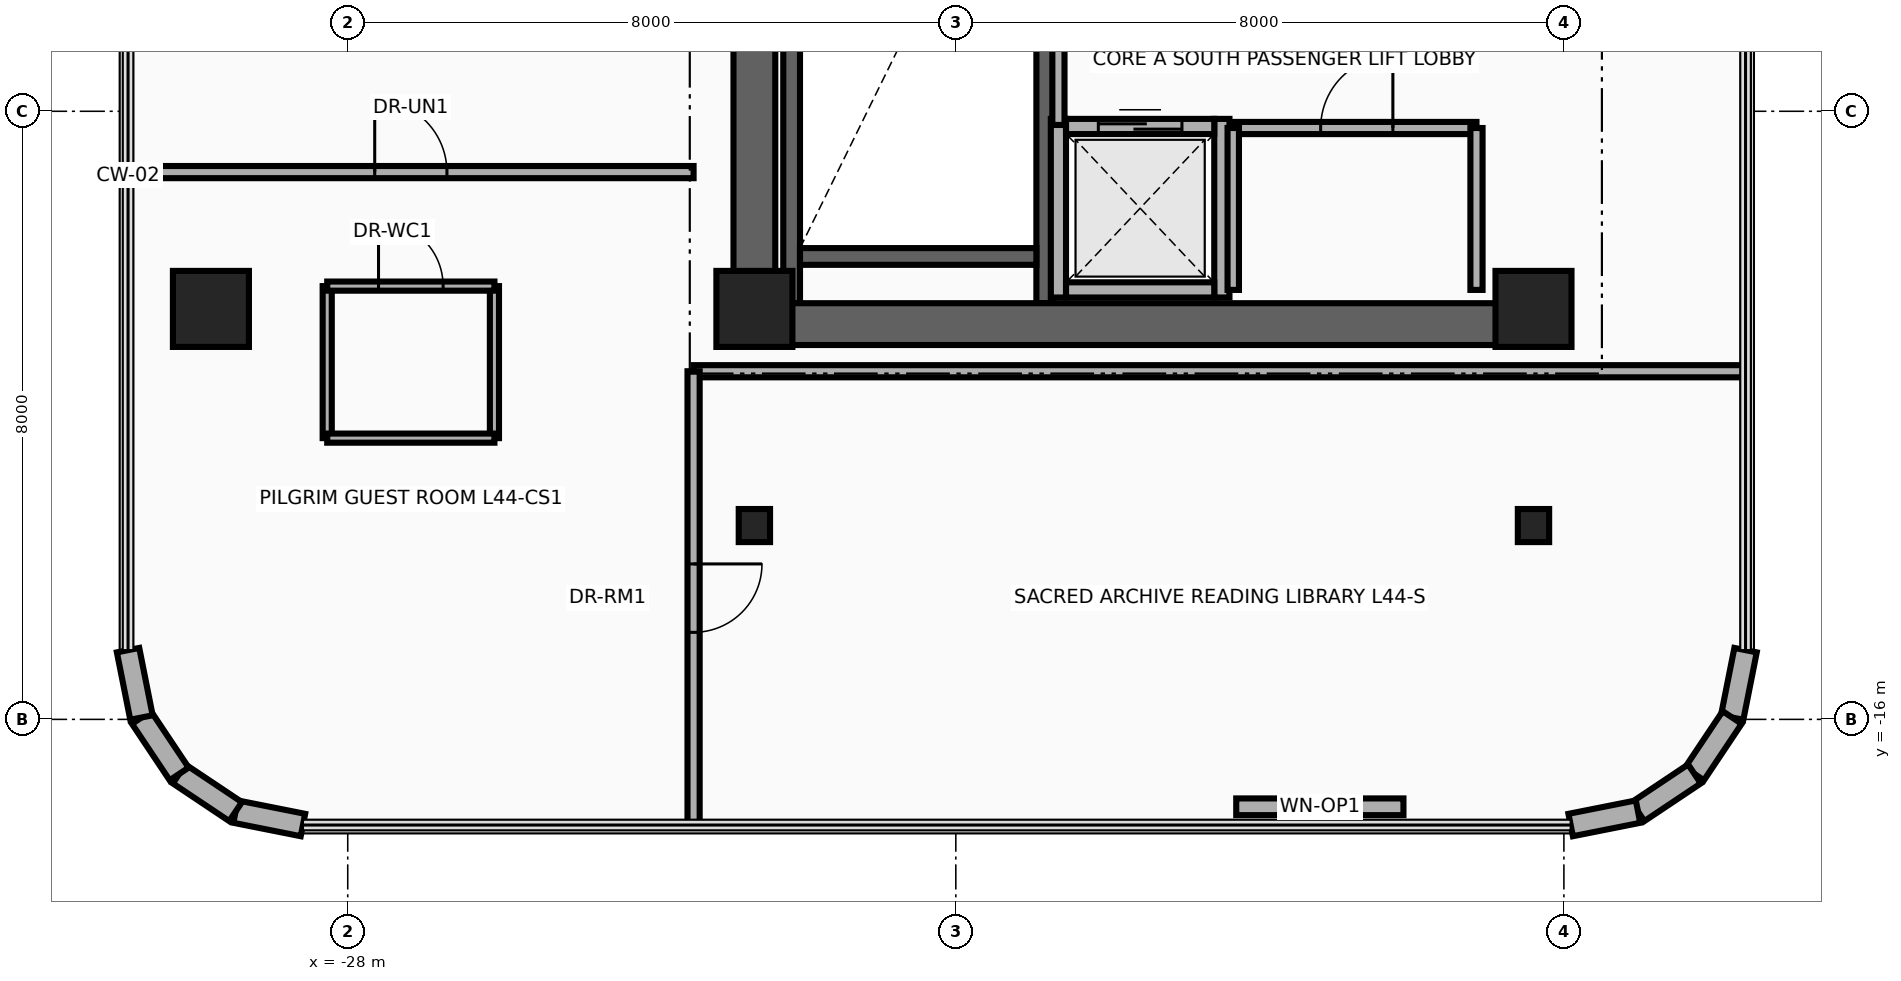
"""IFC4 building model, lengths in metres.
Left out: names, types, materials, properties, quantities, classifications, styles, units other than length and angle.
Written with IfcOpenShell. Run it as: python <this file> out.ifc"""

import sys

from ifc_helpers import new_model, si_unit, direction, frame, frame_2d, origin, origin_2d, place, context, subcontext, project, spatial, rectangle, i_section, extrude, source, transform, mapped, element, fill, save


model = new_model("IFC4")
c1 = context("Model", 3, precision=1e-05, world=origin(), true_north=direction((0.0, 1.0)))
c2 = subcontext(c1, "Body", "Model", "MODEL_VIEW")
j1 = project(units=[si_unit("LENGTHUNIT", "METRE"), si_unit("PLANEANGLEUNIT", "RADIAN")], contexts=[c1])
p1 = place(None, origin())
s1 = spatial("IfcSite", under=j1, at=p1, CompositionType="ELEMENT")
p2 = place(p1, origin())
s2 = spatial("IfcBuilding", under=s1, at=p2, CompositionType="ELEMENT")
p3 = place(p2, frame((0.0, 0.0, 172.3)))
s3 = spatial("IfcBuildingStorey", under=s2, at=p3, CompositionType="ELEMENT", Elevation=172.3)
for number, where, z_axis, x_axis in (
    (1, (-22.16, -10.525, 0.0), (0.0, 0.0, 1.0), (0.0, 1.0, 0.0)),
    (2, (-18.83, -10.525, 0.0), (0.0, 0.0, 1.0), (0.0, 1.0, 0.0)),
):
    element("IfcWall", number, at=place(p3, frame(where, z_axis=z_axis, x_axis=x_axis)), inside=s3, PredefinedType="SHEAR", context=c2, shape_type="SweptSolid", body=[
        extrude(rectangle(XDim=8.745, YDim=0.22, at=frame_2d((4.373, 0.0))), origin(), (0.0, 0.0, 1.0), 3.93),
    ])
p4 = place(p3, frame((-22.05, -9.91, 0.0), z_axis=(0.0, 0.0, 1.0), x_axis=(1.0, 0.0, 0.0)))
e3 = element("IfcWall", 3, at=p4, inside=s3, PredefinedType="SHEAR", context=c2, shape_type="SweptSolid", body=[
    extrude(rectangle(XDim=3.11, YDim=0.22, at=frame_2d((1.555, 0.0))), origin(), (0.0, 0.0, 1.0), 3.93),
])
p5 = place(p3, frame((-22.65, -11.075, 0.0), z_axis=(0.0, 0.0, 1.0), x_axis=(0.0, 1.0, 0.0)))
e4 = element("IfcWall", 4, at=p5, inside=s3, PredefinedType="SHEAR", context=c2, shape_type="SweptSolid", body=[
    extrude(rectangle(XDim=22.15, YDim=0.55, at=frame_2d((11.075, 0.0))), origin(), (0.0, 0.0, 1.0), 3.93),
])
p6 = place(p3, frame((-22.65, -10.8, 0.0), z_axis=(0.0, 0.0, 1.0), x_axis=(1.0, 0.0, 0.0)))
e5 = element("IfcWall", 5, at=p6, inside=s3, PredefinedType="SHEAR", context=c2, shape_type="SweptSolid", body=[
    extrude(rectangle(XDim=10.25, YDim=0.55, at=frame_2d((5.125, 0.0))), origin(), (0.0, 0.0, 1.0), 3.93),
])
m1 = source(origin(), c2, "Body", "SweptSolid", [
    extrude(rectangle(XDim=1.0, YDim=1.0, at=origin_2d()), origin(), (0.0, 0.0, 1.0), 4.25),
])
for number, where, z_axis, x_axis in (
    (6, (-29.8, -10.6, 0.0), (0.0, 0.0, 1.0), (1.0, 0.0, 0.0)),
    (7, (-22.65, -10.6, 0.0), (0.0, 0.0, 1.0), (1.0, 0.0, 0.0)),
    (8, (-12.4, -10.6, 0.0), (0.0, 0.0, 1.0), (1.0, 0.0, 0.0)),
):
    element("IfcColumn", number, at=place(p3, frame(where, z_axis=z_axis, x_axis=x_axis)), inside=s3, PredefinedType="COLUMN", context=c2, shape_type="MappedRepresentation", body=[
        mapped(m1, transform((0.0, 0.0, 0.0), x_axis=(1.0, 0.0, 0.0), y_axis=(0.0, 1.0, 0.0), z_axis=(0.0, 0.0, 1.0), scale=1.0)),
    ])
m2 = source(origin(), c2, "Body", "SweptSolid", [
    extrude(i_section(OverallWidth=0.412, OverallDepth=0.435, WebThickness=0.036, FlangeThickness=0.057, at=origin_2d()), origin(), (0.0, 0.0, 1.0), 4.25),
])
for number, where, z_axis, x_axis in (
    (9, (-22.65, -13.45, 0.0), (0.0, 0.0, 1.0), (1.0, 0.0, 0.0)),
    (10, (-12.4, -13.45, 0.0), (0.0, 0.0, 1.0), (1.0, 0.0, 0.0)),
):
    element("IfcColumn", number, at=place(p3, frame(where, z_axis=z_axis, x_axis=x_axis)), inside=s3, PredefinedType="COLUMN", context=c2, shape_type="MappedRepresentation", body=[
        mapped(m2, transform((0.0, 0.0, 0.0), x_axis=(1.0, 0.0, 0.0), y_axis=(0.0, 1.0, 0.0), z_axis=(0.0, 0.0, 1.0), scale=1.0)),
    ])
p7 = place(p3, frame((-9.61, -15.089, 0.0), z_axis=(0.0, 0.0, 1.0), x_axis=(-0.195025152871, -0.980798241101, 0.0)))
e11 = element("IfcWall", 11, at=p7, inside=s3, PredefinedType="SOLIDWALL", context=c2, shape_type="SweptSolid", body=[
    extrude(rectangle(XDim=0.904, YDim=0.3, at=frame_2d((0.452, 0.0))), origin(), (0.0, 0.0, 1.0), 3.93),
])
for number, where, z_axis, x_axis in (
    (12, (-9.786, -15.976, 0.0), (0.0, 0.0, 1.0), (-0.556, -0.832, 0.0)),
    (13, (-10.282, -16.718, 0.0), (0.0, 0.0, 1.0), (-0.832, -0.556, 0.0)),
):
    element("IfcWall", number, at=place(p3, frame(where, z_axis=z_axis, x_axis=x_axis)), inside=s3, PredefinedType="SOLIDWALL", context=c2, shape_type="SweptSolid", body=[
        extrude(rectangle(XDim=0.893, YDim=0.3, at=frame_2d((0.446, 0.0))), origin(), (0.0, 0.0, 1.0), 3.93),
    ])
p8 = place(p3, frame((-11.024, -17.214, 0.0), z_axis=(0.0, 0.0, 1.0), x_axis=(-0.980798241101, -0.195025152871, 0.0)))
e14 = element("IfcWall", 14, at=p8, inside=s3, PredefinedType="SOLIDWALL", context=c2, shape_type="SweptSolid", body=[
    extrude(rectangle(XDim=0.904, YDim=0.3, at=frame_2d((0.452, 0.0))), origin(), (0.0, 0.0, 1.0), 3.93),
])
p9 = place(p3, frame((-14.111, -17.15, 0.0), z_axis=(0.0, 0.0, 1.0), x_axis=(-1.0, 0.0, 0.0)))
e15 = element("IfcWall", 15, at=p9, inside=s3, PredefinedType="SOLIDWALL", context=c2, shape_type="SweptSolid", body=[
    extrude(rectangle(XDim=2.2, YDim=0.22, at=frame_2d((1.1, 0.0))), origin(), (0.0, 0.0, 1.0), 3.93),
])
p10 = place(p9, frame((0.65, 0.0, 0.95)))
e16 = element("IfcOpeningElement", 16, at=p10, cuts=e15, PredefinedType="OPENING", context=c2, shape_type="SweptSolid", body=[
    extrude(rectangle(XDim=0.9, YDim=1.3, at=frame_2d((0.45, 0.65))), frame((0.0, 0.125, 0.0), z_axis=(0.0, -1.0, 0.0), x_axis=(1.0, 0.0, 0.0)), (0.0, 0.0, 1.0), 0.25),
])
p11 = place(p3, frame((-28.589, -17.39, 0.0), z_axis=(0.0, 0.0, 1.0), x_axis=(-0.980798241101, 0.195025152871, 0.0)))
e17 = element("IfcWall", 17, at=p11, inside=s3, PredefinedType="SOLIDWALL", context=c2, shape_type="SweptSolid", body=[
    extrude(rectangle(XDim=0.904, YDim=0.3, at=frame_2d((0.452, 0.0))), origin(), (0.0, 0.0, 1.0), 3.93),
])
for number, where, z_axis, x_axis in (
    (18, (-29.476, -17.214, 0.0), (0.0, 0.0, 1.0), (-0.832, 0.556, 0.0)),
    (19, (-30.218, -16.718, 0.0), (0.0, 0.0, 1.0), (-0.556, 0.832, 0.0)),
):
    element("IfcWall", number, at=place(p3, frame(where, z_axis=z_axis, x_axis=x_axis)), inside=s3, PredefinedType="SOLIDWALL", context=c2, shape_type="SweptSolid", body=[
        extrude(rectangle(XDim=0.893, YDim=0.3, at=frame_2d((0.446, 0.0))), origin(), (0.0, 0.0, 1.0), 3.93),
    ])
p12 = place(p3, frame((-30.714, -15.976, 0.0), z_axis=(0.0, 0.0, 1.0), x_axis=(-0.195025152871, 0.980798241101, 0.0)))
e20 = element("IfcWall", 20, at=p12, inside=s3, PredefinedType="SOLIDWALL", context=c2, shape_type="SweptSolid", body=[
    extrude(rectangle(XDim=0.904, YDim=0.3, at=frame_2d((0.452, 0.0))), origin(), (0.0, 0.0, 1.0), 3.93),
])
for number, where, z_axis, x_axis in (
    (21, (-18.65, -10.45, 0.0), (0.0, 0.0, 1.0), (0.0, 1.0, 0.0)),
    (22, (-16.5, -10.45, 0.0), (0.0, 0.0, 1.0), (0.0, 1.0, 0.0)),
):
    element("IfcWall", number, at=place(p3, frame(where, z_axis=z_axis, x_axis=x_axis)), inside=s3, PredefinedType="MOVABLE", context=c2, shape_type="SweptSolid", body=[
        extrude(rectangle(XDim=2.35, YDim=0.2, at=frame_2d((1.175, 0.0))), origin(), (0.0, 0.0, 1.0), 2.965),
    ])
p13 = place(p3, frame((-18.55, -10.35, 0.0), z_axis=(0.0, 0.0, 1.0), x_axis=(1.0, 0.0, 0.0)))
e23 = element("IfcWall", 23, at=p13, inside=s3, PredefinedType="MOVABLE", context=c2, shape_type="SweptSolid", body=[
    extrude(rectangle(XDim=1.95, YDim=0.2, at=frame_2d((0.975, 0.0))), origin(), (0.0, 0.0, 1.0), 2.965),
])
p14 = place(p3, frame((-18.55, -8.2, 0.0), z_axis=(0.0, 0.0, 1.0), x_axis=(1.0, 0.0, 0.0)))
e24 = element("IfcWall", 24, at=p14, inside=s3, PredefinedType="MOVABLE", context=c2, shape_type="SweptSolid", body=[
    extrude(rectangle(XDim=1.95, YDim=0.2, at=frame_2d((0.975, 0.0))), origin(), (0.0, 0.0, 1.0), 3.93),
])
p15 = place(p14, frame((0.425, 0.0, 0.0)))
e25 = element("IfcOpeningElement", 25, at=p15, cuts=e24, PredefinedType="OPENING", context=c2, shape_type="SweptSolid", body=[
    extrude(rectangle(XDim=1.1, YDim=2.1, at=frame_2d((0.55, 1.05))), frame((0.0, 0.115, 0.0), z_axis=(0.0, -1.0, 0.0), x_axis=(1.0, 0.0, 0.0)), (0.0, 0.0, 1.0), 0.23),
])
p16 = place(p3, frame((-18.65, -8.18, 0.0), z_axis=(0.0, 0.0, 1.0), x_axis=(0.0, 1.0, 0.0)))
e26 = element("IfcWall", 26, at=p16, inside=s3, PredefinedType="PARTITIONING", context=c2, shape_type="SweptSolid", body=[
    extrude(rectangle(XDim=1.56, YDim=0.16, at=frame_2d((0.78, 0.0))), origin(), (0.0, 0.0, 1.0), 3.93),
])
p17 = place(p3, frame((-16.35, -8.22, 0.0), z_axis=(0.0, 0.0, 1.0), x_axis=(1.0, 0.0, 0.0)))
e27 = element("IfcWall", 27, at=p17, inside=s3, PredefinedType="PARTITIONING", context=c2, shape_type="SweptSolid", body=[
    extrude(rectangle(XDim=3.2, YDim=0.16, at=frame_2d((1.6, 0.0))), origin(), (0.0, 0.0, 1.0), 3.93),
])
p18 = place(p17, frame((1.15, 0.0, 0.0)))
e28 = element("IfcOpeningElement", 28, at=p18, cuts=e27, PredefinedType="OPENING", context=c2, shape_type="SweptSolid", body=[
    extrude(rectangle(XDim=0.95, YDim=2.15, at=frame_2d((0.475, 1.075))), frame((0.0, 0.095, 0.0), z_axis=(0.0, -1.0, 0.0), x_axis=(1.0, 0.0, 0.0)), (0.0, 0.0, 1.0), 0.19),
])
p19 = place(p3, frame((-16.35, -10.35, 0.0), z_axis=(0.0, 0.0, 1.0), x_axis=(0.0, 1.0, 0.0)))
e29 = element("IfcWall", 29, at=p19, inside=s3, PredefinedType="PARTITIONING", context=c2, shape_type="SweptSolid", body=[
    extrude(rectangle(XDim=2.13, YDim=0.15, at=frame_2d((1.065, 0.0))), origin(), (0.0, 0.0, 1.0), 3.93),
])
p20 = place(p3, frame((-13.15, -10.35, 0.0), z_axis=(0.0, 0.0, 1.0), x_axis=(0.0, 1.0, 0.0)))
e30 = element("IfcWall", 30, at=p20, inside=s3, PredefinedType="PARTITIONING", context=c2, shape_type="SweptSolid", body=[
    extrude(rectangle(XDim=2.13, YDim=0.16, at=frame_2d((1.065, 0.0))), origin(), (0.0, 0.0, 1.0), 3.93),
])
p21 = place(p3, frame((-23.45, -11.42, 0.0), z_axis=(0.0, 0.0, 1.0), x_axis=(1.0, 0.0, 0.0)))
e31 = element("IfcWall", 31, at=p21, inside=s3, PredefinedType="PARTITIONING", context=c2, shape_type="SweptSolid", body=[
    extrude(rectangle(XDim=13.84, YDim=0.16, at=frame_2d((6.92, 0.0))), origin(), (0.0, 0.0, 1.0), 3.304),
])
p22 = place(p3, frame((-23.45, -17.39, 0.0), z_axis=(0.0, 0.0, 1.0), x_axis=(0.0, 1.0, 0.0)))
e32 = element("IfcWall", 32, at=p22, inside=s3, PredefinedType="PARTITIONING", context=c2, shape_type="SweptSolid", body=[
    extrude(rectangle(XDim=5.97, YDim=0.16, at=frame_2d((2.985, 0.0))), origin(), (0.0, 0.0, 1.0), 3.93),
])
p23 = place(p22, frame((2.535, 0.0, 0.0)))
e33 = element("IfcOpeningElement", 33, at=p23, cuts=e32, PredefinedType="OPENING", context=c2, shape_type="SweptSolid", body=[
    extrude(rectangle(XDim=0.9, YDim=2.1, at=frame_2d((0.45, 1.05))), frame((0.0, 0.095, 0.0), z_axis=(0.0, -1.0, 0.0), x_axis=(1.0, 0.0, 0.0)), (0.0, 0.0, 1.0), 0.19),
])
p24 = place(p3, frame((-30.89, -8.8, 0.0), z_axis=(0.0, 0.0, 1.0), x_axis=(1.0, 0.0, 0.0)))
e34 = element("IfcWall", 34, at=p24, inside=s3, PredefinedType="PARTITIONING", context=c2, shape_type="SweptSolid", body=[
    extrude(rectangle(XDim=7.44, YDim=0.16, at=frame_2d((3.72, 0.0))), origin(), (0.0, 0.0, 1.0), 3.376),
])
p25 = place(p24, frame((3.245, 0.0, 0.0)))
e35 = element("IfcOpeningElement", 35, at=p25, cuts=e34, PredefinedType="OPENING", context=c2, shape_type="SweptSolid", body=[
    extrude(rectangle(XDim=0.95, YDim=2.15, at=frame_2d((0.475, 1.075))), frame((0.0, 0.095, 0.0), z_axis=(0.0, -1.0, 0.0), x_axis=(1.0, 0.0, 0.0)), (0.0, 0.0, 1.0), 0.19),
])
for number, where, z_axis, x_axis in (
    (36, (-28.27, -12.3, 0.0), (0.0, 0.0, 1.0), (0.0, 1.0, 0.0)),
    (37, (-26.07, -12.3, 0.0), (0.0, 0.0, 1.0), (0.0, 1.0, 0.0)),
):
    element("IfcWall", number, at=place(p3, frame(where, z_axis=z_axis, x_axis=x_axis)), inside=s3, PredefinedType="PARTITIONING", context=c2, shape_type="SweptSolid", body=[
        extrude(rectangle(XDim=2.0, YDim=0.12, at=frame_2d((1.0, 0.0))), origin(), (0.0, 0.0, 1.0), 2.965),
    ])
p26 = place(p3, frame((-28.27, -12.3, 0.0), z_axis=(0.0, 0.0, 1.0), x_axis=(1.0, 0.0, 0.0)))
e38 = element("IfcWall", 38, at=p26, inside=s3, PredefinedType="PARTITIONING", context=c2, shape_type="SweptSolid", body=[
    extrude(rectangle(XDim=2.2, YDim=0.12, at=frame_2d((1.1, 0.0))), origin(), (0.0, 0.0, 1.0), 3.93),
])
p27 = place(p3, frame((-28.27, -10.3, 0.0), z_axis=(0.0, 0.0, 1.0), x_axis=(1.0, 0.0, 0.0)))
e39 = element("IfcWall", 39, at=p27, inside=s3, PredefinedType="PARTITIONING", context=c2, shape_type="SweptSolid", body=[
    extrude(rectangle(XDim=2.2, YDim=0.12, at=frame_2d((1.1, 0.0))), origin(), (0.0, 0.0, 1.0), 3.93),
])
p28 = place(p27, frame((0.675, 0.0, 0.0)))
e40 = element("IfcOpeningElement", 40, at=p28, cuts=e39, PredefinedType="OPENING", context=c2, shape_type="SweptSolid", body=[
    extrude(rectangle(XDim=0.85, YDim=2.1, at=frame_2d((0.425, 1.05))), frame((0.0, 0.075, 0.0), z_axis=(0.0, -1.0, 0.0), x_axis=(1.0, 0.0, 0.0)), (0.0, 0.0, 1.0), 0.15),
])
p29 = place(p10, origin())
e41 = element("IfcWindow", 41, at=p29, inside=s3, PartitioningType="SINGLE_PANEL", PredefinedType="WINDOW", context=c2, shape_type="SweptSolid", body=[
    extrude(rectangle(XDim=0.9, YDim=1.3, at=frame_2d((0.45, 0.65))), frame((0.0, 0.03, 0.0), z_axis=(0.0, -1.0, 0.0), x_axis=(1.0, 0.0, 0.0)), (0.0, 0.0, 1.0), 0.06),
])
fill(e16, e41)
p30 = place(p15, origin())
e42 = element("IfcDoor", 42, at=p30, inside=s3, OperationType="DOUBLE_DOOR_SLIDING", PredefinedType="DOOR", context=c2, shape_type="SweptSolid", body=[
    extrude(rectangle(XDim=1.1, YDim=2.1, at=frame_2d((0.55, 1.05))), frame((0.0, 0.025, 0.0), z_axis=(0.0, -1.0, 0.0), x_axis=(1.0, 0.0, 0.0)), (0.0, 0.0, 1.0), 0.05),
])
fill(e25, e42)
p31 = place(p18, origin())
e43 = element("IfcDoor", 43, at=p31, inside=s3, OperationType="SINGLE_SWING_LEFT", PredefinedType="DOOR", context=c2, shape_type="SweptSolid", body=[
    extrude(rectangle(XDim=0.95, YDim=2.15, at=frame_2d((0.475, 1.075))), frame((0.0, 0.025, 0.0), z_axis=(0.0, -1.0, 0.0), x_axis=(1.0, 0.0, 0.0)), (0.0, 0.0, 1.0), 0.05),
])
fill(e28, e43)
p32 = place(p25, origin())
e44 = element("IfcDoor", 44, at=p32, inside=s3, OperationType="SINGLE_SWING_RIGHT", PredefinedType="DOOR", context=c2, shape_type="SweptSolid", body=[
    extrude(rectangle(XDim=0.95, YDim=2.15, at=frame_2d((0.475, 1.075))), frame((0.0, 0.025, 0.0), z_axis=(0.0, -1.0, 0.0), x_axis=(1.0, 0.0, 0.0)), (0.0, 0.0, 1.0), 0.05),
])
fill(e35, e44)
p33 = place(p28, origin())
e45 = element("IfcDoor", 45, at=p33, inside=s3, OperationType="SINGLE_SWING_LEFT", PredefinedType="DOOR", context=c2, shape_type="SweptSolid", body=[
    extrude(rectangle(XDim=0.85, YDim=2.1, at=frame_2d((0.425, 1.05))), frame((0.0, 0.025, 0.0), z_axis=(0.0, -1.0, 0.0), x_axis=(1.0, 0.0, 0.0)), (0.0, 0.0, 1.0), 0.05),
])
fill(e40, e45)
p34 = place(p23, frame((0.9, 0.0, 0.0), z_axis=(0.0, 0.0, 1.0), x_axis=(-1.0, 0.0, 0.0)))
e46 = element("IfcDoor", 46, at=p34, inside=s3, OperationType="SINGLE_SWING_LEFT", PredefinedType="DOOR", context=c2, shape_type="SweptSolid", body=[
    extrude(rectangle(XDim=0.9, YDim=2.1, at=frame_2d((0.45, 1.05))), frame((0.0, 0.025, 0.0), z_axis=(0.0, -1.0, 0.0), x_axis=(1.0, 0.0, 0.0)), (0.0, 0.0, 1.0), 0.05),
])
fill(e33, e46)
save(model, sys.argv[1])
